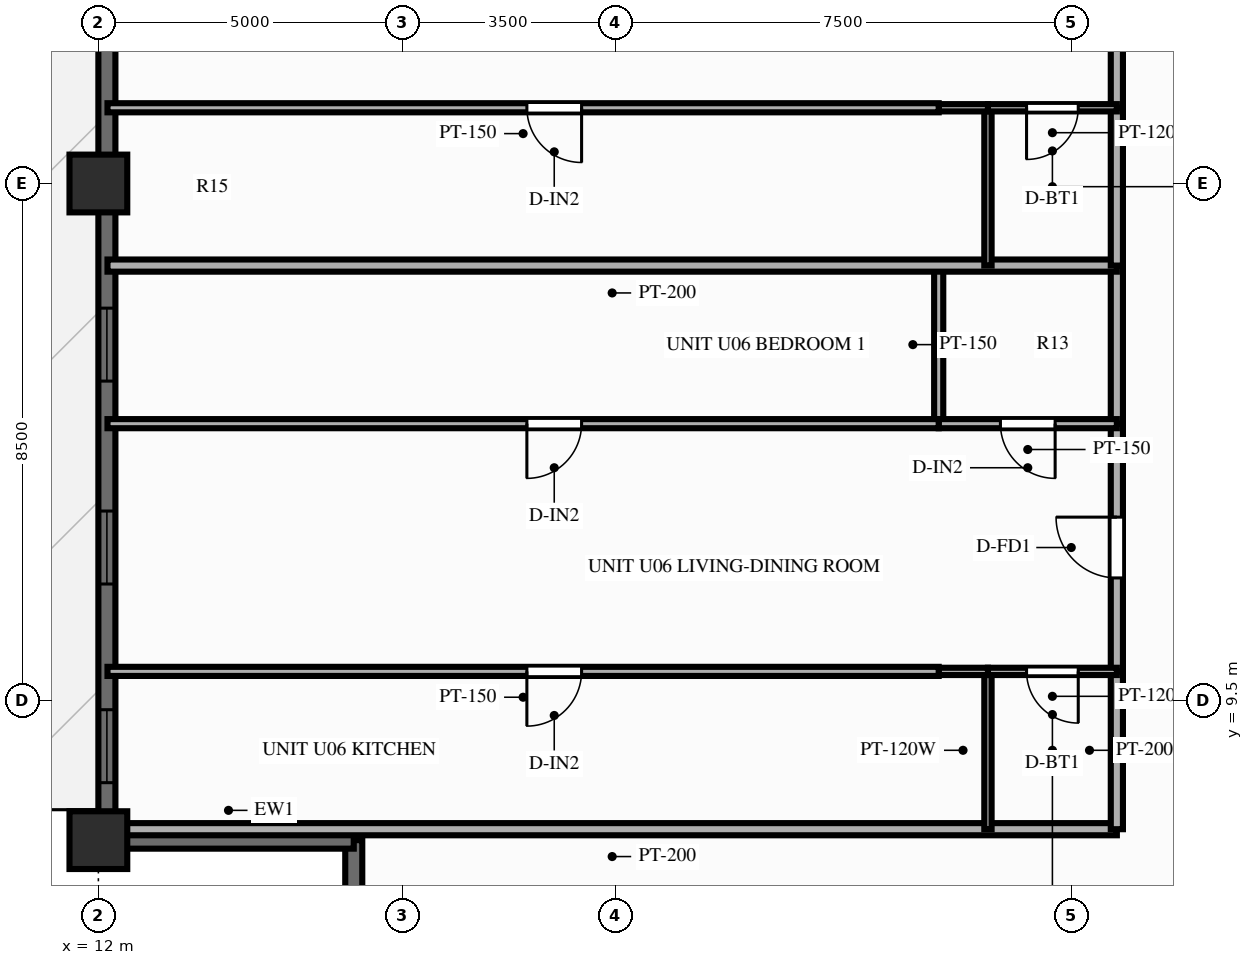
"""IFC4 building model, lengths in metres.
Left out: names, types, materials, properties, quantities, classifications, styles, units other than length and angle.
Written with IfcOpenShell. Run it as: python <this file> out.ifc"""

import sys

from ifc_helpers import new_model, si_unit, direction, frame, frame_2d, origin, origin_2d, place, context, subcontext, project, spatial, rectangle, extrude, source, transform, mapped, element, fill, save


model = new_model("IFC4")
c1 = context("Model", 3, precision=1e-05, world=origin(), true_north=direction((0.0, 1.0)))
c2 = subcontext(c1, "Body", "Model", "MODEL_VIEW")
j1 = project(units=[si_unit("LENGTHUNIT", "METRE"), si_unit("PLANEANGLEUNIT", "RADIAN")], contexts=[c1])
p1 = place(None, origin())
s1 = spatial("IfcSite", under=j1, at=p1, CompositionType="ELEMENT")
p2 = place(p1, origin())
s2 = spatial("IfcBuilding", under=s1, at=p2, CompositionType="ELEMENT")
p3 = place(p2, frame((0.0, 0.0, 104.85)))
s3 = spatial("IfcBuildingStorey", under=s2, at=p3, CompositionType="ELEMENT", Elevation=104.85)
m1 = source(origin(), c2, "Body", "SweptSolid", [
    extrude(rectangle(XDim=0.95, YDim=0.95, at=origin_2d()), origin(), (0.0, 0.0, 1.0), 3.0),
])
for number, where, z_axis, x_axis in (
    (1, (12.0, 18.0, 0.0), (0.0, 0.0, 1.0), (1.0, 0.0, 0.0)),
    (2, (12.0, 7.2, 0.0), (0.0, 0.0, 1.0), (1.0, 0.0, 0.0)),
):
    element("IfcColumn", number, at=place(p3, frame(where, z_axis=z_axis, x_axis=x_axis)), inside=s3, PredefinedType="COLUMN", context=c2, shape_type="MappedRepresentation", body=[
        mapped(m1, transform((0.0, 0.0, 0.0), scale=1.0)),
    ])
p4 = place(p3, frame((12.14, 7.2, 0.0), z_axis=(0.0, 0.0, 1.0), x_axis=(0.0, 1.0, 0.0)))
e3 = element("IfcWall", 3, at=p4, inside=s3, PredefinedType="SOLIDWALL", context=c2, shape_type="SweptSolid", body=[
    extrude(rectangle(XDim=39.6, YDim=0.28, at=frame_2d((19.8, 0.0))), origin(), (0.0, 0.0, 1.0), 2.28),
])
p5 = place(p4, frame((0.945, 0.0, 0.25)))
e4 = element("IfcOpeningElement", 4, at=p5, cuts=e3, PredefinedType="OPENING", context=c2, shape_type="SweptSolid", body=[
    extrude(rectangle(XDim=1.2, YDim=1.5, at=frame_2d((0.6, 0.75))), frame((0.0, 0.152, 0.0), z_axis=(0.0, -1.0, 0.0), x_axis=(1.0, 0.0, 0.0)), (0.0, 0.0, 1.0), 0.304),
])
p6 = place(p4, frame((4.213, 0.0, 0.25)))
e5 = element("IfcOpeningElement", 5, at=p6, cuts=e3, PredefinedType="OPENING", context=c2, shape_type="SweptSolid", body=[
    extrude(rectangle(XDim=1.2, YDim=1.5, at=frame_2d((0.6, 0.75))), frame((0.0, 0.152, 0.0), z_axis=(0.0, -1.0, 0.0), x_axis=(1.0, 0.0, 0.0)), (0.0, 0.0, 1.0), 0.304),
])
p7 = place(p4, frame((7.55, 0.0, 0.25)))
e6 = element("IfcOpeningElement", 6, at=p7, cuts=e3, PredefinedType="OPENING", context=c2, shape_type="SweptSolid", body=[
    extrude(rectangle(XDim=1.2, YDim=1.5, at=frame_2d((0.6, 0.75))), frame((0.0, 0.152, 0.0), z_axis=(0.0, -1.0, 0.0), x_axis=(1.0, 0.0, 0.0)), (0.0, 0.0, 1.0), 0.304),
])
p8 = place(p4, frame((13.483, 0.0, 0.25)))
e7 = element("IfcOpeningElement", 7, at=p8, cuts=e3, PredefinedType="OPENING", context=c2, shape_type="SweptSolid", body=[
    extrude(rectangle(XDim=1.2, YDim=1.5, at=frame_2d((0.6, 0.75))), frame((0.0, 0.152, 0.0), z_axis=(0.0, -1.0, 0.0), x_axis=(1.0, 0.0, 0.0)), (0.0, 0.0, 1.0), 0.304),
])
p9 = place(p4, frame((16.82, 0.0, 0.25)))
e8 = element("IfcOpeningElement", 8, at=p9, cuts=e3, PredefinedType="OPENING", context=c2, shape_type="SweptSolid", body=[
    extrude(rectangle(XDim=1.2, YDim=1.5, at=frame_2d((0.6, 0.75))), frame((0.0, 0.152, 0.0), z_axis=(0.0, -1.0, 0.0), x_axis=(1.0, 0.0, 0.0)), (0.0, 0.0, 1.0), 0.304),
])
p10 = place(p4, frame((19.2, 0.0, 0.25)))
e9 = element("IfcOpeningElement", 9, at=p10, cuts=e3, PredefinedType="OPENING", context=c2, shape_type="SweptSolid", body=[
    extrude(rectangle(XDim=1.2, YDim=1.5, at=frame_2d((0.6, 0.75))), frame((0.0, 0.152, 0.0), z_axis=(0.0, -1.0, 0.0), x_axis=(1.0, 0.0, 0.0)), (0.0, 0.0, 1.0), 0.304),
])
p11 = place(p4, frame((21.578, 0.0, 0.25)))
e10 = element("IfcOpeningElement", 10, at=p11, cuts=e3, PredefinedType="OPENING", context=c2, shape_type="SweptSolid", body=[
    extrude(rectangle(XDim=1.2, YDim=1.5, at=frame_2d((0.6, 0.75))), frame((0.0, 0.152, 0.0), z_axis=(0.0, -1.0, 0.0), x_axis=(1.0, 0.0, 0.0)), (0.0, 0.0, 1.0), 0.304),
])
p12 = place(p4, frame((24.713, 0.0, 0.0)))
e11 = element("IfcOpeningElement", 11, at=p12, cuts=e3, PredefinedType="OPENING", context=c2, shape_type="SweptSolid", body=[
    extrude(rectangle(XDim=1.6, YDim=2.15, at=frame_2d((0.8, 1.075))), frame((0.0, 0.152, 0.0), z_axis=(0.0, -1.0, 0.0), x_axis=(1.0, 0.0, 0.0)), (0.0, 0.0, 1.0), 0.304),
])
p13 = place(p4, frame((29.305, 0.0, 0.25)))
e12 = element("IfcOpeningElement", 12, at=p13, cuts=e3, PredefinedType="OPENING", context=c2, shape_type="SweptSolid", body=[
    extrude(rectangle(XDim=0.7, YDim=1.5, at=frame_2d((0.35, 0.75))), frame((0.0, 0.152, 0.0), z_axis=(0.0, -1.0, 0.0), x_axis=(1.0, 0.0, 0.0)), (0.0, 0.0, 1.0), 0.304),
])
p14 = place(p4, frame((30.848, 0.0, 0.25)))
e13 = element("IfcOpeningElement", 13, at=p14, cuts=e3, PredefinedType="OPENING", context=c2, shape_type="SweptSolid", body=[
    extrude(rectangle(XDim=1.2, YDim=1.5, at=frame_2d((0.6, 0.75))), frame((0.0, 0.152, 0.0), z_axis=(0.0, -1.0, 0.0), x_axis=(1.0, 0.0, 0.0)), (0.0, 0.0, 1.0), 0.304),
])
p15 = place(p4, frame((34.183, 0.0, 0.25)))
e14 = element("IfcOpeningElement", 14, at=p15, cuts=e3, PredefinedType="OPENING", context=c2, shape_type="SweptSolid", body=[
    extrude(rectangle(XDim=1.2, YDim=1.5, at=frame_2d((0.6, 0.75))), frame((0.0, 0.152, 0.0), z_axis=(0.0, -1.0, 0.0), x_axis=(1.0, 0.0, 0.0)), (0.0, 0.0, 1.0), 0.304),
])
p16 = place(p4, frame((37.452, 0.0, 0.25)))
e15 = element("IfcOpeningElement", 15, at=p16, cuts=e3, PredefinedType="OPENING", context=c2, shape_type="SweptSolid", body=[
    extrude(rectangle(XDim=1.2, YDim=1.5, at=frame_2d((0.6, 0.75))), frame((0.0, 0.152, 0.0), z_axis=(0.0, -1.0, 0.0), x_axis=(1.0, 0.0, 0.0)), (0.0, 0.0, 1.0), 0.304),
])
for number, where, z_axis, x_axis in (
    (16, (16.2, 3.08, 0.0), (0.0, 0.0, 1.0), (0.0, 1.0, 0.0)),
    (17, (12.08, 7.2, 0.0), (0.0, 0.0, 1.0), (1.0, 0.0, 0.0)),
):
    element("IfcWall", number, at=place(p3, frame(where, z_axis=z_axis, x_axis=x_axis)), inside=s3, PredefinedType="SOLIDWALL", context=c2, shape_type="SweptSolid", body=[
        extrude(rectangle(XDim=4.12, YDim=0.28, at=frame_2d((2.06, 0.0))), origin(), (0.0, 0.0, 1.0), 2.28),
    ])
p17 = place(p3, frame((28.75, 7.38, 0.0), z_axis=(0.0, 0.0, 1.0), x_axis=(-1.0, 0.0, 0.0)))
e18 = element("IfcWall", 18, at=p17, inside=s3, PredefinedType="PARTITIONING", context=c2, shape_type="SweptSolid", body=[
    extrude(rectangle(XDim=16.6, YDim=0.2, at=frame_2d((8.3, 0.0))), origin(), (0.0, 0.0, 1.0), 2.79),
])
p18 = place(p3, frame((28.75, 7.38, 0.0), z_axis=(0.0, 0.0, 1.0), x_axis=(0.0, 1.0, 0.0)))
e19 = element("IfcWall", 19, at=p18, inside=s3, PredefinedType="PARTITIONING", context=c2, shape_type="SweptSolid", body=[
    extrude(rectangle(XDim=2.596, YDim=0.2, at=frame_2d((1.298, 0.0))), origin(), (0.0, 0.0, 1.0), 2.79),
])
p19 = place(p3, frame((28.75, 9.976, 0.0), z_axis=(0.0, 0.0, 1.0), x_axis=(0.0, 1.0, 0.0)))
e20 = element("IfcWall", 20, at=p19, inside=s3, PredefinedType="PARTITIONING", context=c2, shape_type="SweptSolid", body=[
    extrude(rectangle(XDim=4.074, YDim=0.2, at=frame_2d((2.037, 0.0))), origin(), (0.0, 0.0, 1.0), 2.79),
])
p20 = place(p19, frame((1.537, 0.0, 0.0)))
e21 = element("IfcOpeningElement", 21, at=p20, cuts=e20, PredefinedType="OPENING", context=c2, shape_type="SweptSolid", body=[
    extrude(rectangle(XDim=1.0, YDim=2.15, at=frame_2d((0.5, 1.075))), frame((0.0, 0.112, 0.0), z_axis=(0.0, -1.0, 0.0), x_axis=(1.0, 0.0, 0.0)), (0.0, 0.0, 1.0), 0.224),
])
p21 = place(p3, frame((28.75, 14.05, 0.0), z_axis=(0.0, 0.0, 1.0), x_axis=(0.0, 1.0, 0.0)))
e22 = element("IfcWall", 22, at=p21, inside=s3, PredefinedType="PARTITIONING", context=c2, shape_type="SweptSolid", body=[
    extrude(rectangle(XDim=2.6, YDim=0.2, at=frame_2d((1.3, 0.0))), origin(), (0.0, 0.0, 1.0), 2.79),
])
p22 = place(p3, frame((26.63, 7.38, 0.0), z_axis=(0.0, 0.0, 1.0), x_axis=(0.0, 1.0, 0.0)))
e23 = element("IfcWall", 23, at=p22, inside=s3, PredefinedType="PARTITIONING", context=c2, shape_type="SweptSolid", body=[
    extrude(rectangle(XDim=2.596, YDim=0.12, at=frame_2d((1.298, 0.0))), origin(), (0.0, 0.0, 1.0), 2.79),
])
p23 = place(p3, frame((25.82, 14.05, 0.0), z_axis=(0.0, 0.0, 1.0), x_axis=(0.0, 1.0, 0.0)))
e24 = element("IfcWall", 24, at=p23, inside=s3, PredefinedType="PARTITIONING", context=c2, shape_type="SweptSolid", body=[
    extrude(rectangle(XDim=2.6, YDim=0.15, at=frame_2d((1.3, 0.0))), origin(), (0.0, 0.0, 1.0), 2.79),
])
p24 = place(p3, frame((28.75, 9.976, 0.0), z_axis=(0.0, 0.0, 1.0), x_axis=(-1.0, 0.0, 0.0)))
e25 = element("IfcWall", 25, at=p24, inside=s3, PredefinedType="PARTITIONING", context=c2, shape_type="SweptSolid", body=[
    extrude(rectangle(XDim=2.12, YDim=0.12, at=frame_2d((1.06, 0.0))), origin(), (0.0, 0.0, 1.0), 2.79),
])
p25 = place(p24, frame((0.635, 0.0, 0.0)))
e26 = element("IfcOpeningElement", 26, at=p25, cuts=e25, PredefinedType="OPENING", context=c2, shape_type="SweptSolid", body=[
    extrude(rectangle(XDim=0.85, YDim=2.05, at=frame_2d((0.425, 1.025))), frame((0.0, 0.072, 0.0), z_axis=(0.0, -1.0, 0.0), x_axis=(1.0, 0.0, 0.0)), (0.0, 0.0, 1.0), 0.144),
])
p26 = place(p3, frame((26.63, 9.976, 0.0), z_axis=(0.0, 0.0, 1.0), x_axis=(-1.0, 0.0, 0.0)))
e27 = element("IfcWall", 27, at=p26, inside=s3, PredefinedType="PARTITIONING", context=c2, shape_type="SweptSolid", body=[
    extrude(rectangle(XDim=0.81, YDim=0.12, at=frame_2d((0.405, 0.0))), origin(), (0.0, 0.0, 1.0), 2.79),
])
p27 = place(p3, frame((25.82, 9.976, 0.0), z_axis=(0.0, 0.0, 1.0), x_axis=(-1.0, 0.0, 0.0)))
e28 = element("IfcWall", 28, at=p27, inside=s3, PredefinedType="PARTITIONING", context=c2, shape_type="SweptSolid", body=[
    extrude(rectangle(XDim=13.67, YDim=0.15, at=frame_2d((6.835, 0.0))), origin(), (0.0, 0.0, 1.0), 2.79),
])
p28 = place(p27, frame((5.873, 0.0, 0.0)))
e29 = element("IfcOpeningElement", 29, at=p28, cuts=e28, PredefinedType="OPENING", context=c2, shape_type="SweptSolid", body=[
    extrude(rectangle(XDim=0.9, YDim=2.1, at=frame_2d((0.45, 1.05))), frame((0.0, 0.087, 0.0), z_axis=(0.0, -1.0, 0.0), x_axis=(1.0, 0.0, 0.0)), (0.0, 0.0, 1.0), 0.174),
])
p29 = place(p3, frame((28.75, 14.05, 0.0), z_axis=(0.0, 0.0, 1.0), x_axis=(-1.0, 0.0, 0.0)))
e30 = element("IfcWall", 30, at=p29, inside=s3, PredefinedType="PARTITIONING", context=c2, shape_type="SweptSolid", body=[
    extrude(rectangle(XDim=2.93, YDim=0.15, at=frame_2d((1.465, 0.0))), origin(), (0.0, 0.0, 1.0), 2.79),
])
p30 = place(p29, frame((1.015, 0.0, 0.0)))
e31 = element("IfcOpeningElement", 31, at=p30, cuts=e30, PredefinedType="OPENING", context=c2, shape_type="SweptSolid", body=[
    extrude(rectangle(XDim=0.9, YDim=2.1, at=frame_2d((0.45, 1.05))), frame((0.0, 0.087, 0.0), z_axis=(0.0, -1.0, 0.0), x_axis=(1.0, 0.0, 0.0)), (0.0, 0.0, 1.0), 0.174),
])
p31 = place(p3, frame((25.82, 14.05, 0.0), z_axis=(0.0, 0.0, 1.0), x_axis=(-1.0, 0.0, 0.0)))
e32 = element("IfcWall", 32, at=p31, inside=s3, PredefinedType="PARTITIONING", context=c2, shape_type="SweptSolid", body=[
    extrude(rectangle(XDim=13.67, YDim=0.15, at=frame_2d((6.835, 0.0))), origin(), (0.0, 0.0, 1.0), 2.79),
])
p32 = place(p31, frame((5.873, 0.0, 0.0)))
e33 = element("IfcOpeningElement", 33, at=p32, cuts=e32, PredefinedType="OPENING", context=c2, shape_type="SweptSolid", body=[
    extrude(rectangle(XDim=0.9, YDim=2.1, at=frame_2d((0.45, 1.05))), frame((0.0, 0.087, 0.0), z_axis=(0.0, -1.0, 0.0), x_axis=(1.0, 0.0, 0.0)), (0.0, 0.0, 1.0), 0.174),
])
p33 = place(p3, frame((28.75, 16.65, 0.0), z_axis=(0.0, 0.0, 1.0), x_axis=(-1.0, 0.0, 0.0)))
e34 = element("IfcWall", 34, at=p33, inside=s3, PredefinedType="PARTITIONING", context=c2, shape_type="SweptSolid", body=[
    extrude(rectangle(XDim=16.6, YDim=0.2, at=frame_2d((8.3, 0.0))), origin(), (0.0, 0.0, 1.0), 2.79),
])
p34 = place(p3, frame((28.75, 16.65, 0.0), z_axis=(0.0, 0.0, 1.0), x_axis=(0.0, 1.0, 0.0)))
e35 = element("IfcWall", 35, at=p34, inside=s3, PredefinedType="PARTITIONING", context=c2, shape_type="SweptSolid", body=[
    extrude(rectangle(XDim=2.596, YDim=0.2, at=frame_2d((1.298, 0.0))), origin(), (0.0, 0.0, 1.0), 2.79),
])
p35 = place(p3, frame((28.75, 19.246, 0.0), z_axis=(0.0, 0.0, 1.0), x_axis=(0.0, 1.0, 0.0)))
e36 = element("IfcWall", 36, at=p35, inside=s3, PredefinedType="PARTITIONING", context=c2, shape_type="SweptSolid", body=[
    extrude(rectangle(XDim=4.074, YDim=0.2, at=frame_2d((2.037, 0.0))), origin(), (0.0, 0.0, 1.0), 2.79),
])
p36 = place(p35, frame((1.537, 0.0, 0.0)))
e37 = element("IfcOpeningElement", 37, at=p36, cuts=e36, PredefinedType="OPENING", context=c2, shape_type="SweptSolid", body=[
    extrude(rectangle(XDim=1.0, YDim=2.15, at=frame_2d((0.5, 1.075))), frame((0.0, 0.112, 0.0), z_axis=(0.0, -1.0, 0.0), x_axis=(1.0, 0.0, 0.0)), (0.0, 0.0, 1.0), 0.224),
])
p37 = place(p3, frame((26.63, 16.65, 0.0), z_axis=(0.0, 0.0, 1.0), x_axis=(0.0, 1.0, 0.0)))
e38 = element("IfcWall", 38, at=p37, inside=s3, PredefinedType="PARTITIONING", context=c2, shape_type="SweptSolid", body=[
    extrude(rectangle(XDim=2.596, YDim=0.12, at=frame_2d((1.298, 0.0))), origin(), (0.0, 0.0, 1.0), 2.79),
])
p38 = place(p3, frame((28.75, 19.246, 0.0), z_axis=(0.0, 0.0, 1.0), x_axis=(-1.0, 0.0, 0.0)))
e39 = element("IfcWall", 39, at=p38, inside=s3, PredefinedType="PARTITIONING", context=c2, shape_type="SweptSolid", body=[
    extrude(rectangle(XDim=2.12, YDim=0.12, at=frame_2d((1.06, 0.0))), origin(), (0.0, 0.0, 1.0), 2.79),
])
p39 = place(p38, frame((0.635, 0.0, 0.0)))
e40 = element("IfcOpeningElement", 40, at=p39, cuts=e39, PredefinedType="OPENING", context=c2, shape_type="SweptSolid", body=[
    extrude(rectangle(XDim=0.85, YDim=2.05, at=frame_2d((0.425, 1.025))), frame((0.0, 0.072, 0.0), z_axis=(0.0, -1.0, 0.0), x_axis=(1.0, 0.0, 0.0)), (0.0, 0.0, 1.0), 0.144),
])
p40 = place(p3, frame((26.63, 19.246, 0.0), z_axis=(0.0, 0.0, 1.0), x_axis=(-1.0, 0.0, 0.0)))
e41 = element("IfcWall", 41, at=p40, inside=s3, PredefinedType="PARTITIONING", context=c2, shape_type="SweptSolid", body=[
    extrude(rectangle(XDim=0.81, YDim=0.12, at=frame_2d((0.405, 0.0))), origin(), (0.0, 0.0, 1.0), 2.79),
])
p41 = place(p3, frame((25.82, 19.246, 0.0), z_axis=(0.0, 0.0, 1.0), x_axis=(-1.0, 0.0, 0.0)))
e42 = element("IfcWall", 42, at=p41, inside=s3, PredefinedType="PARTITIONING", context=c2, shape_type="SweptSolid", body=[
    extrude(rectangle(XDim=13.67, YDim=0.15, at=frame_2d((6.835, 0.0))), origin(), (0.0, 0.0, 1.0), 2.79),
])
p42 = place(p41, frame((5.873, 0.0, 0.0)))
e43 = element("IfcOpeningElement", 43, at=p42, cuts=e42, PredefinedType="OPENING", context=c2, shape_type="SweptSolid", body=[
    extrude(rectangle(XDim=0.9, YDim=2.1, at=frame_2d((0.45, 1.05))), frame((0.0, 0.087, 0.0), z_axis=(0.0, -1.0, 0.0), x_axis=(1.0, 0.0, 0.0)), (0.0, 0.0, 1.0), 0.174),
])
m2 = source(origin(), c2, "Body", "SweptSolid", [
    extrude(rectangle(XDim=1.2, YDim=1.5, at=frame_2d((0.6, 0.75))), frame((0.0, 0.03, 0.0), z_axis=(0.0, -1.0, 0.0), x_axis=(1.0, 0.0, 0.0)), (0.0, 0.0, 1.0), 0.06),
])
p43 = place(p5, origin())
e44 = element("IfcWindow", 44, at=p43, inside=s3, PartitioningType="SINGLE_PANEL", PredefinedType="WINDOW", context=c2, shape_type="MappedRepresentation", body=[
    mapped(m2, transform((0.0, 0.0, 0.0), scale=1.0)),
])
fill(e4, e44)
p44 = place(p6, origin())
e45 = element("IfcWindow", 45, at=p44, inside=s3, PartitioningType="SINGLE_PANEL", PredefinedType="WINDOW", context=c2, shape_type="MappedRepresentation", body=[
    mapped(m2, transform((0.0, 0.0, 0.0), scale=1.0)),
])
fill(e5, e45)
p45 = place(p7, origin())
e46 = element("IfcWindow", 46, at=p45, inside=s3, PartitioningType="SINGLE_PANEL", PredefinedType="WINDOW", context=c2, shape_type="MappedRepresentation", body=[
    mapped(m2, transform((0.0, 0.0, 0.0), scale=1.0)),
])
fill(e6, e46)
m3 = source(origin(), c2, "Body", "SweptSolid", [
    extrude(rectangle(XDim=1.0, YDim=2.15, at=frame_2d((0.5, 1.075))), frame((0.0, 0.025, 0.0), z_axis=(0.0, -1.0, 0.0), x_axis=(1.0, 0.0, 0.0)), (0.0, 0.0, 1.0), 0.05),
])
p46 = place(p20, origin())
e47 = element("IfcDoor", 47, at=p46, inside=s3, OperationType="SINGLE_SWING_RIGHT", PredefinedType="DOOR", context=c2, shape_type="MappedRepresentation", body=[
    mapped(m3, transform((0.0, 0.0, 0.0), scale=1.0)),
])
fill(e21, e47)
m4 = source(origin(), c2, "Body", "SweptSolid", [
    extrude(rectangle(XDim=0.85, YDim=2.05, at=frame_2d((0.425, 1.025))), frame((0.0, 0.025, 0.0), z_axis=(0.0, -1.0, 0.0), x_axis=(1.0, 0.0, 0.0)), (0.0, 0.0, 1.0), 0.05),
])
p47 = place(p25, origin())
e48 = element("IfcDoor", 48, at=p47, inside=s3, OperationType="SINGLE_SWING_LEFT", PredefinedType="DOOR", context=c2, shape_type="MappedRepresentation", body=[
    mapped(m4, transform((0.0, 0.0, 0.0), scale=1.0)),
])
fill(e26, e48)
m5 = source(origin(), c2, "Body", "SweptSolid", [
    extrude(rectangle(XDim=0.9, YDim=2.1, at=frame_2d((0.45, 1.05))), frame((0.0, 0.025, 0.0), z_axis=(0.0, -1.0, 0.0), x_axis=(1.0, 0.0, 0.0)), (0.0, 0.0, 1.0), 0.05),
])
p48 = place(p28, origin())
e49 = element("IfcDoor", 49, at=p48, inside=s3, OperationType="SINGLE_SWING_RIGHT", PredefinedType="DOOR", context=c2, shape_type="MappedRepresentation", body=[
    mapped(m5, transform((0.0, 0.0, 0.0), scale=1.0)),
])
fill(e29, e49)
p49 = place(p30, origin())
e50 = element("IfcDoor", 50, at=p49, inside=s3, OperationType="SINGLE_SWING_LEFT", PredefinedType="DOOR", context=c2, shape_type="MappedRepresentation", body=[
    mapped(m5, transform((0.0, 0.0, 0.0), scale=1.0)),
])
fill(e31, e50)
p50 = place(p32, origin())
e51 = element("IfcDoor", 51, at=p50, inside=s3, OperationType="SINGLE_SWING_RIGHT", PredefinedType="DOOR", context=c2, shape_type="MappedRepresentation", body=[
    mapped(m5, transform((0.0, 0.0, 0.0), scale=1.0)),
])
fill(e33, e51)
p51 = place(p39, origin())
e52 = element("IfcDoor", 52, at=p51, inside=s3, OperationType="SINGLE_SWING_RIGHT", PredefinedType="DOOR", context=c2, shape_type="MappedRepresentation", body=[
    mapped(m4, transform((0.0, 0.0, 0.0), scale=1.0)),
])
fill(e40, e52)
p52 = place(p42, origin())
e53 = element("IfcDoor", 53, at=p52, inside=s3, OperationType="SINGLE_SWING_LEFT", PredefinedType="DOOR", context=c2, shape_type="MappedRepresentation", body=[
    mapped(m5, transform((0.0, 0.0, 0.0), scale=1.0)),
])
fill(e43, e53)
save(model, sys.argv[1])
